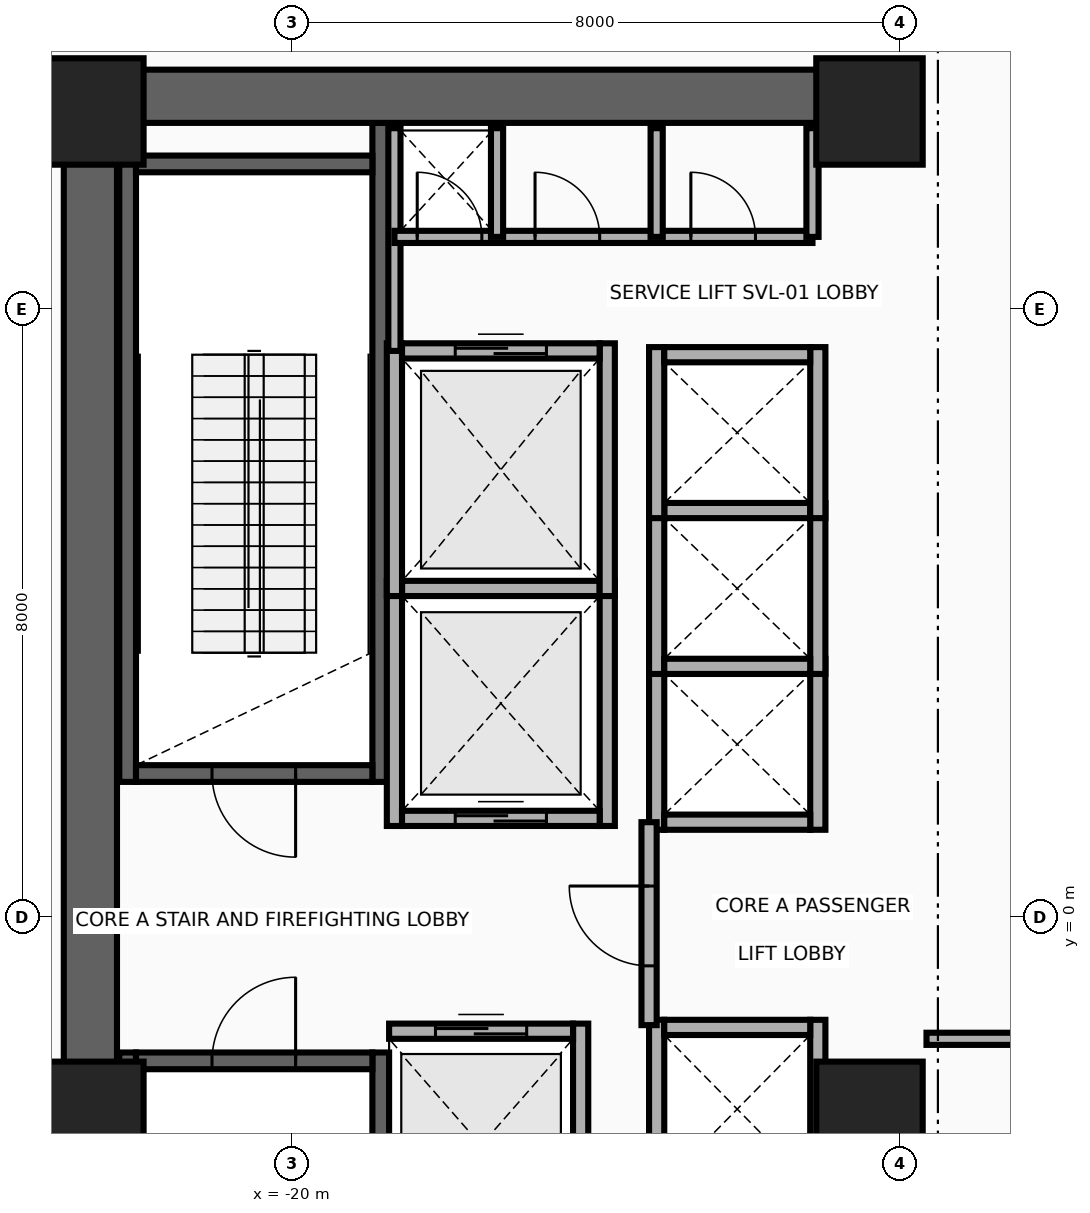
"""IFC4 building model, lengths in metres.
Left out: names, types, materials, properties, quantities, classifications, styles, units other than length and angle.
Written with IfcOpenShell. Run it as: python <this file> out.ifc"""

import sys

from ifc_helpers import new_model, si_unit, direction, frame, frame_2d, origin, origin_2d, place, context, subcontext, project, spatial, rectangle, extrude, source, transform, mapped, element, fill, save


model = new_model("IFC4")
c1 = context("Model", 3, precision=1e-05, world=origin(), true_north=direction((0.0, 1.0)))
c2 = subcontext(c1, "Body", "Model", "MODEL_VIEW")
j1 = project(units=[si_unit("LENGTHUNIT", "METRE"), si_unit("PLANEANGLEUNIT", "RADIAN")], contexts=[c1])
p1 = place(None, origin())
s1 = spatial("IfcSite", under=j1, at=p1, CompositionType="ELEMENT")
p2 = place(p1, origin())
s2 = spatial("IfcBuilding", under=s1, at=p2, CompositionType="ELEMENT")
p3 = place(p2, frame((0.0, 0.0, 5.2)))
s3 = spatial("IfcBuildingStorey", under=s2, at=p3, CompositionType="ELEMENT", Elevation=5.2)
for number, where, z_axis, x_axis in (
    (1, (-22.16, 1.78, 0.0), (0.0, 0.0, 1.0), (0.0, 1.0, 0.0)),
    (2, (-18.83, 1.78, 0.0), (0.0, 0.0, 1.0), (0.0, 1.0, 0.0)),
):
    element("IfcWall", number, at=place(p3, frame(where, z_axis=z_axis, x_axis=x_axis)), inside=s3, PredefinedType="SHEAR", context=c2, shape_type="SweptSolid", body=[
        extrude(rectangle(XDim=8.67, YDim=0.22, at=frame_2d((4.335, 0.0))), origin(), (0.0, 0.0, 1.0), 4.92),
    ])
p4 = place(p3, frame((-22.05, 1.89, 0.0), z_axis=(0.0, 0.0, 1.0), x_axis=(1.0, 0.0, 0.0)))
e3 = element("IfcWall", 3, at=p4, inside=s3, PredefinedType="SHEAR", context=c2, shape_type="SweptSolid", body=[
    extrude(rectangle(XDim=3.11, YDim=0.22, at=frame_2d((1.555, 0.0))), origin(), (0.0, 0.0, 1.0), 4.92),
])
p5 = place(p4, frame((1.0, 0.0, 0.0)))
e4 = element("IfcOpeningElement", 4, at=p5, cuts=e3, PredefinedType="OPENING", context=c2, shape_type="SweptSolid", body=[
    extrude(rectangle(XDim=1.1, YDim=2.15, at=frame_2d((0.55, 1.075))), frame((0.0, 0.125, 0.0), z_axis=(0.0, -1.0, 0.0), x_axis=(1.0, 0.0, 0.0)), (0.0, 0.0, 1.0), 0.25),
])
p6 = place(p3, frame((-22.05, 9.91, 0.0), z_axis=(0.0, 0.0, 1.0), x_axis=(1.0, 0.0, 0.0)))
e5 = element("IfcWall", 5, at=p6, inside=s3, PredefinedType="SHEAR", context=c2, shape_type="SweptSolid", body=[
    extrude(rectangle(XDim=3.11, YDim=0.22, at=frame_2d((1.555, 0.0))), origin(), (0.0, 0.0, 1.0), 4.92),
])
for number, where, z_axis, x_axis in (
    (6, (-22.16, -10.45, 0.0), (0.0, 0.0, 1.0), (0.0, 1.0, 0.0)),
    (7, (-18.83, -10.45, 0.0), (0.0, 0.0, 1.0), (0.0, 1.0, 0.0)),
):
    element("IfcWall", number, at=place(p3, frame(where, z_axis=z_axis, x_axis=x_axis)), inside=s3, PredefinedType="SHEAR", context=c2, shape_type="SweptSolid", body=[
        extrude(rectangle(XDim=8.67, YDim=0.22, at=frame_2d((4.335, 0.0))), origin(), (0.0, 0.0, 1.0), 4.92),
    ])
p7 = place(p3, frame((-22.05, -1.89, 0.0), z_axis=(0.0, 0.0, 1.0), x_axis=(1.0, 0.0, 0.0)))
e8 = element("IfcWall", 8, at=p7, inside=s3, PredefinedType="SHEAR", context=c2, shape_type="SweptSolid", body=[
    extrude(rectangle(XDim=3.11, YDim=0.22, at=frame_2d((1.555, 0.0))), origin(), (0.0, 0.0, 1.0), 4.92),
])
p8 = place(p7, frame((1.0, 0.0, 0.0)))
e9 = element("IfcOpeningElement", 9, at=p8, cuts=e8, PredefinedType="OPENING", context=c2, shape_type="SweptSolid", body=[
    extrude(rectangle(XDim=1.1, YDim=2.15, at=frame_2d((0.55, 1.075))), frame((0.0, 0.125, 0.0), z_axis=(0.0, -1.0, 0.0), x_axis=(1.0, 0.0, 0.0)), (0.0, 0.0, 1.0), 0.25),
])
p9 = place(p3, frame((-22.65, -11.15, 0.0), z_axis=(0.0, 0.0, 1.0), x_axis=(0.0, 1.0, 0.0)))
e10 = element("IfcWall", 10, at=p9, inside=s3, PredefinedType="SHEAR", context=c2, shape_type="SweptSolid", body=[
    extrude(rectangle(XDim=22.3, YDim=0.7, at=frame_2d((11.15, 0.0))), origin(), (0.0, 0.0, 1.0), 4.92),
])
p10 = place(p3, frame((-22.65, 10.8, 0.0), z_axis=(0.0, 0.0, 1.0), x_axis=(1.0, 0.0, 0.0)))
e11 = element("IfcWall", 11, at=p10, inside=s3, PredefinedType="SHEAR", context=c2, shape_type="SweptSolid", body=[
    extrude(rectangle(XDim=10.25, YDim=0.7, at=frame_2d((5.125, 0.0))), origin(), (0.0, 0.0, 1.0), 4.92),
])
m1 = source(origin(), c2, "Body", "SweptSolid", [
    extrude(rectangle(XDim=1.4, YDim=1.4, at=origin_2d()), origin(), (0.0, 0.0, 1.0), 5.2),
])
for number, where, z_axis, x_axis in (
    (12, (-22.65, -2.6, 0.0), (0.0, 0.0, 1.0), (1.0, 0.0, 0.0)),
    (13, (-12.4, -2.6, 0.0), (0.0, 0.0, 1.0), (1.0, 0.0, 0.0)),
    (14, (-22.65, 10.6, 0.0), (0.0, 0.0, 1.0), (1.0, 0.0, 0.0)),
    (15, (-12.4, 10.6, 0.0), (0.0, 0.0, 1.0), (1.0, 0.0, 0.0)),
):
    element("IfcColumn", number, at=place(p3, frame(where, z_axis=z_axis, x_axis=x_axis)), inside=s3, PredefinedType="COLUMN", context=c2, shape_type="MappedRepresentation", body=[
        mapped(m1, transform((0.0, 0.0, 0.0), x_axis=(1.0, 0.0, 0.0), y_axis=(0.0, 1.0, 0.0), z_axis=(0.0, 0.0, 1.0), scale=1.0)),
    ])
for number, where, z_axis, x_axis in (
    (16, (-18.65, 1.2, 0.0), (0.0, 0.0, 1.0), (0.0, 1.0, 0.0)),
    (17, (-15.85, 1.2, 0.0), (0.0, 0.0, 1.0), (0.0, 1.0, 0.0)),
):
    element("IfcWall", number, at=place(p3, frame(where, z_axis=z_axis, x_axis=x_axis)), inside=s3, PredefinedType="MOVABLE", context=c2, shape_type="SweptSolid", body=[
        extrude(rectangle(XDim=3.225, YDim=0.2, at=frame_2d((1.613, 0.0))), origin(), (0.0, 0.0, 1.0), 4.92),
    ])
p11 = place(p3, frame((-18.55, 1.3, 0.0), z_axis=(0.0, 0.0, 1.0), x_axis=(1.0, 0.0, 0.0)))
e18 = element("IfcWall", 18, at=p11, inside=s3, PredefinedType="MOVABLE", context=c2, shape_type="SweptSolid", body=[
    extrude(rectangle(XDim=2.6, YDim=0.2, at=frame_2d((1.3, 0.0))), origin(), (0.0, 0.0, 1.0), 4.92),
])
p12 = place(p11, frame((0.7, 0.0, 0.0)))
e19 = element("IfcOpeningElement", 19, at=p12, cuts=e18, PredefinedType="OPENING", context=c2, shape_type="SweptSolid", body=[
    extrude(rectangle(XDim=1.2, YDim=2.1, at=frame_2d((0.6, 1.05))), frame((0.0, 0.115, 0.0), z_axis=(0.0, -1.0, 0.0), x_axis=(1.0, 0.0, 0.0)), (0.0, 0.0, 1.0), 0.23),
])
p13 = place(p3, frame((-18.55, 4.325, 0.0), z_axis=(0.0, 0.0, 1.0), x_axis=(1.0, 0.0, 0.0)))
e20 = element("IfcWall", 20, at=p13, inside=s3, PredefinedType="MOVABLE", context=c2, shape_type="SweptSolid", body=[
    extrude(rectangle(XDim=2.6, YDim=0.2, at=frame_2d((1.3, 0.0))), origin(), (0.0, 0.0, 1.0), 4.92),
])
p14 = place(p3, frame((-16.2, -4.6, 0.0), z_axis=(0.0, 0.0, 1.0), x_axis=(0.0, 1.0, 0.0)))
e21 = element("IfcWall", 21, at=p14, inside=s3, PredefinedType="MOVABLE", context=c2, shape_type="SweptSolid", body=[
    extrude(rectangle(XDim=3.2, YDim=0.2, at=frame_2d((1.6, 0.0))), origin(), (0.0, 0.0, 1.0), 4.92),
])
p15 = place(p3, frame((-18.72, -1.5, 0.0), z_axis=(0.0, 0.0, 1.0), x_axis=(1.0, 0.0, 0.0)))
e22 = element("IfcWall", 22, at=p15, inside=s3, PredefinedType="MOVABLE", context=c2, shape_type="SweptSolid", body=[
    extrude(rectangle(XDim=2.42, YDim=0.2, at=frame_2d((1.21, 0.0))), origin(), (0.0, 0.0, 1.0), 4.92),
])
p16 = place(p15, frame((0.61, 0.0, 0.0)))
e23 = element("IfcOpeningElement", 23, at=p16, cuts=e22, PredefinedType="OPENING", context=c2, shape_type="SweptSolid", body=[
    extrude(rectangle(XDim=1.2, YDim=2.1, at=frame_2d((0.6, 1.05))), frame((0.0, 0.115, 0.0), z_axis=(0.0, -1.0, 0.0), x_axis=(1.0, 0.0, 0.0)), (0.0, 0.0, 1.0), 0.23),
])
for number, where, z_axis, x_axis in (
    (24, (-18.65, 4.225, 0.0), (0.0, 0.0, 1.0), (0.0, 1.0, 0.0)),
    (25, (-15.85, 4.225, 0.0), (0.0, 0.0, 1.0), (0.0, 1.0, 0.0)),
):
    element("IfcWall", number, at=place(p3, frame(where, z_axis=z_axis, x_axis=x_axis)), inside=s3, PredefinedType="MOVABLE", context=c2, shape_type="SweptSolid", body=[
        extrude(rectangle(XDim=3.325, YDim=0.2, at=frame_2d((1.663, 0.0))), origin(), (0.0, 0.0, 1.0), 4.92),
    ])
p17 = place(p3, frame((-18.55, 7.45, 0.0), z_axis=(0.0, 0.0, 1.0), x_axis=(1.0, 0.0, 0.0)))
e26 = element("IfcWall", 26, at=p17, inside=s3, PredefinedType="MOVABLE", context=c2, shape_type="SweptSolid", body=[
    extrude(rectangle(XDim=2.6, YDim=0.2, at=frame_2d((1.3, 0.0))), origin(), (0.0, 0.0, 1.0), 4.92),
])
p18 = place(p17, frame((0.7, 0.0, 0.0)))
e27 = element("IfcOpeningElement", 27, at=p18, cuts=e26, PredefinedType="OPENING", context=c2, shape_type="SweptSolid", body=[
    extrude(rectangle(XDim=1.2, YDim=2.1, at=frame_2d((0.6, 1.05))), frame((0.0, 0.115, 0.0), z_axis=(0.0, -1.0, 0.0), x_axis=(1.0, 0.0, 0.0)), (0.0, 0.0, 1.0), 0.23),
])
for number, where, z_axis, x_axis in (
    (28, (-15.2, 1.15, 0.0), (0.0, 0.0, 1.0), (0.0, 1.0, 0.0)),
    (29, (-13.08, 1.15, 0.0), (0.0, 0.0, 1.0), (0.0, 1.0, 0.0)),
):
    element("IfcWall", number, at=place(p3, frame(where, z_axis=z_axis, x_axis=x_axis)), inside=s3, PredefinedType="MOVABLE", context=c2, shape_type="SweptSolid", body=[
        extrude(rectangle(XDim=2.25, YDim=0.2, at=frame_2d((1.125, 0.0))), origin(), (0.0, 0.0, 1.0), 4.92),
    ])
p19 = place(p3, frame((-15.1, 1.25, 0.0), z_axis=(0.0, 0.0, 1.0), x_axis=(1.0, 0.0, 0.0)))
e30 = element("IfcWall", 30, at=p19, inside=s3, PredefinedType="MOVABLE", context=c2, shape_type="SweptSolid", body=[
    extrude(rectangle(XDim=1.92, YDim=0.2, at=frame_2d((0.96, 0.0))), origin(), (0.0, 0.0, 1.0), 4.92),
])
for number, where, z_axis, x_axis in (
    (31, (-15.2, 3.2, 0.0), (0.0, 0.0, 1.0), (0.0, 1.0, 0.0)),
    (32, (-13.08, 3.2, 0.0), (0.0, 0.0, 1.0), (0.0, 1.0, 0.0)),
):
    element("IfcWall", number, at=place(p3, frame(where, z_axis=z_axis, x_axis=x_axis)), inside=s3, PredefinedType="MOVABLE", context=c2, shape_type="SweptSolid", body=[
        extrude(rectangle(XDim=2.25, YDim=0.2, at=frame_2d((1.125, 0.0))), origin(), (0.0, 0.0, 1.0), 4.92),
    ])
for number, where, z_axis, x_axis in (
    (33, (-15.1, 3.3, 0.0), (0.0, 0.0, 1.0), (1.0, 0.0, 0.0)),
    (34, (-15.1, 5.35, 0.0), (0.0, 0.0, 1.0), (1.0, 0.0, 0.0)),
):
    element("IfcWall", number, at=place(p3, frame(where, z_axis=z_axis, x_axis=x_axis)), inside=s3, PredefinedType="MOVABLE", context=c2, shape_type="SweptSolid", body=[
        extrude(rectangle(XDim=1.92, YDim=0.2, at=frame_2d((0.96, 0.0))), origin(), (0.0, 0.0, 1.0), 4.92),
    ])
for number, where, z_axis, x_axis in (
    (35, (-15.2, 5.25, 0.0), (0.0, 0.0, 1.0), (0.0, 1.0, 0.0)),
    (36, (-13.08, 5.25, 0.0), (0.0, 0.0, 1.0), (0.0, 1.0, 0.0)),
):
    element("IfcWall", number, at=place(p3, frame(where, z_axis=z_axis, x_axis=x_axis)), inside=s3, PredefinedType="MOVABLE", context=c2, shape_type="SweptSolid", body=[
        extrude(rectangle(XDim=2.25, YDim=0.2, at=frame_2d((1.125, 0.0))), origin(), (0.0, 0.0, 1.0), 4.92),
    ])
p20 = place(p3, frame((-15.1, 7.4, 0.0), z_axis=(0.0, 0.0, 1.0), x_axis=(1.0, 0.0, 0.0)))
e37 = element("IfcWall", 37, at=p20, inside=s3, PredefinedType="MOVABLE", context=c2, shape_type="SweptSolid", body=[
    extrude(rectangle(XDim=1.92, YDim=0.2, at=frame_2d((0.96, 0.0))), origin(), (0.0, 0.0, 1.0), 4.92),
])
for number, where, z_axis, x_axis in (
    (38, (-15.2, -3.7, 0.0), (0.0, 0.0, 1.0), (0.0, 1.0, 0.0)),
    (39, (-13.08, -3.7, 0.0), (0.0, 0.0, 1.0), (0.0, 1.0, 0.0)),
):
    element("IfcWall", number, at=place(p3, frame(where, z_axis=z_axis, x_axis=x_axis)), inside=s3, PredefinedType="MOVABLE", context=c2, shape_type="SweptSolid", body=[
        extrude(rectangle(XDim=2.35, YDim=0.2, at=frame_2d((1.175, 0.0))), origin(), (0.0, 0.0, 1.0), 4.92),
    ])
p21 = place(p3, frame((-15.1, -1.45, 0.0), z_axis=(0.0, 0.0, 1.0), x_axis=(1.0, 0.0, 0.0)))
e40 = element("IfcWall", 40, at=p21, inside=s3, PredefinedType="MOVABLE", context=c2, shape_type="SweptSolid", body=[
    extrude(rectangle(XDim=1.92, YDim=0.2, at=frame_2d((0.96, 0.0))), origin(), (0.0, 0.0, 1.0), 4.92),
])
p22 = place(p3, frame((-15.3, -1.42, 0.0), z_axis=(0.0, 0.0, 1.0), x_axis=(0.0, 1.0, 0.0)))
e41 = element("IfcWall", 41, at=p22, inside=s3, PredefinedType="PARTITIONING", context=c2, shape_type="SweptSolid", body=[
    extrude(rectangle(XDim=2.67, YDim=0.2, at=frame_2d((1.335, 0.0))), origin(), (0.0, 0.0, 1.0), 4.92),
])
p23 = place(p22, frame((0.78, 0.0, 0.0)))
e42 = element("IfcOpeningElement", 42, at=p23, cuts=e41, PredefinedType="OPENING", context=c2, shape_type="SweptSolid", body=[
    extrude(rectangle(XDim=1.05, YDim=2.15, at=frame_2d((0.525, 1.075))), frame((0.0, 0.115, 0.0), z_axis=(0.0, -1.0, 0.0), x_axis=(1.0, 0.0, 0.0)), (0.0, 0.0, 1.0), 0.23),
])
p24 = place(p3, frame((-18.65, 7.45, 0.0), z_axis=(0.0, 0.0, 1.0), x_axis=(0.0, 1.0, 0.0)))
e43 = element("IfcWall", 43, at=p24, inside=s3, PredefinedType="PARTITIONING", context=c2, shape_type="SweptSolid", body=[
    extrude(rectangle(XDim=2.93, YDim=0.16, at=frame_2d((1.465, 0.0))), origin(), (0.0, 0.0, 1.0), 3.957),
])
p25 = place(p3, frame((-18.65, 8.95, 0.0), z_axis=(0.0, 0.0, 1.0), x_axis=(1.0, 0.0, 0.0)))
e44 = element("IfcWall", 44, at=p25, inside=s3, PredefinedType="PARTITIONING", context=c2, shape_type="SweptSolid", body=[
    extrude(rectangle(XDim=5.5, YDim=0.16, at=frame_2d((2.75, 0.0))), origin(), (0.0, 0.0, 1.0), 4.92),
])
p26 = place(p25, frame((0.3, 0.0, 0.0)))
e45 = element("IfcOpeningElement", 45, at=p26, cuts=e44, PredefinedType="OPENING", context=c2, shape_type="SweptSolid", body=[
    extrude(rectangle(XDim=0.85, YDim=2.05, at=frame_2d((0.425, 1.025))), frame((0.0, 0.095, 0.0), z_axis=(0.0, -1.0, 0.0), x_axis=(1.0, 0.0, 0.0)), (0.0, 0.0, 1.0), 0.19),
])
p27 = place(p25, frame((1.85, 0.0, 0.0)))
e46 = element("IfcOpeningElement", 46, at=p27, cuts=e44, PredefinedType="OPENING", context=c2, shape_type="SweptSolid", body=[
    extrude(rectangle(XDim=0.85, YDim=2.05, at=frame_2d((0.425, 1.025))), frame((0.0, 0.095, 0.0), z_axis=(0.0, -1.0, 0.0), x_axis=(1.0, 0.0, 0.0)), (0.0, 0.0, 1.0), 0.19),
])
p28 = place(p25, frame((3.9, 0.0, 0.0)))
e47 = element("IfcOpeningElement", 47, at=p28, cuts=e44, PredefinedType="OPENING", context=c2, shape_type="SweptSolid", body=[
    extrude(rectangle(XDim=0.85, YDim=2.05, at=frame_2d((0.425, 1.025))), frame((0.0, 0.095, 0.0), z_axis=(0.0, -1.0, 0.0), x_axis=(1.0, 0.0, 0.0)), (0.0, 0.0, 1.0), 0.19),
])
for number, where, z_axis, x_axis in (
    (48, (-13.15, 8.95, 0.0), (0.0, 0.0, 1.0), (0.0, 1.0, 0.0)),
    (49, (-17.3, 8.95, 0.0), (0.0, 0.0, 1.0), (0.0, 1.0, 0.0)),
    (50, (-15.2, 8.95, 0.0), (0.0, 0.0, 1.0), (0.0, 1.0, 0.0)),
):
    element("IfcWall", number, at=place(p3, frame(where, z_axis=z_axis, x_axis=x_axis)), inside=s3, PredefinedType="PARTITIONING", context=c2, shape_type="SweptSolid", body=[
        extrude(rectangle(XDim=1.43, YDim=0.16, at=frame_2d((0.715, 0.0))), origin(), (0.0, 0.0, 1.0), 3.957),
    ])
p29 = place(p3, frame((-11.65, -1.6, 0.0), z_axis=(0.0, 0.0, 1.0), x_axis=(1.0, 0.0, 0.0)))
e51 = element("IfcWall", 51, at=p29, inside=s3, PredefinedType="PARTITIONING", context=c2, shape_type="SweptSolid", body=[
    extrude(rectangle(XDim=1.85, YDim=0.16, at=frame_2d((0.925, 0.0))), origin(), (0.0, 0.0, 1.0), 4.92),
])
p30 = place(p12, origin())
e52 = element("IfcDoor", 52, at=p30, inside=s3, OperationType="DOUBLE_DOOR_SLIDING", PredefinedType="DOOR", context=c2, shape_type="SweptSolid", body=[
    extrude(rectangle(XDim=1.2, YDim=2.1, at=frame_2d((0.6, 1.05))), frame((0.0, 0.025, 0.0), z_axis=(0.0, -1.0, 0.0), x_axis=(1.0, 0.0, 0.0)), (0.0, 0.0, 1.0), 0.05),
])
fill(e19, e52)
p31 = place(p16, origin())
e53 = element("IfcDoor", 53, at=p31, inside=s3, OperationType="DOUBLE_DOOR_SLIDING", PredefinedType="DOOR", context=c2, shape_type="SweptSolid", body=[
    extrude(rectangle(XDim=1.2, YDim=2.1, at=frame_2d((0.6, 1.05))), frame((0.0, 0.025, 0.0), z_axis=(0.0, -1.0, 0.0), x_axis=(1.0, 0.0, 0.0)), (0.0, 0.0, 1.0), 0.05),
])
fill(e23, e53)
p32 = place(p18, origin())
e54 = element("IfcDoor", 54, at=p32, inside=s3, OperationType="DOUBLE_DOOR_SLIDING", PredefinedType="DOOR", context=c2, shape_type="SweptSolid", body=[
    extrude(rectangle(XDim=1.2, YDim=2.1, at=frame_2d((0.6, 1.05))), frame((0.0, 0.025, 0.0), z_axis=(0.0, -1.0, 0.0), x_axis=(1.0, 0.0, 0.0)), (0.0, 0.0, 1.0), 0.05),
])
fill(e27, e54)
p33 = place(p23, origin())
e55 = element("IfcDoor", 55, at=p33, inside=s3, OperationType="SINGLE_SWING_RIGHT", PredefinedType="DOOR", context=c2, shape_type="SweptSolid", body=[
    extrude(rectangle(XDim=1.05, YDim=2.15, at=frame_2d((0.525, 1.075))), frame((0.0, 0.025, 0.0), z_axis=(0.0, -1.0, 0.0), x_axis=(1.0, 0.0, 0.0)), (0.0, 0.0, 1.0), 0.05),
])
fill(e42, e55)
p34 = place(p5, frame((1.1, 0.0, 0.0), z_axis=(0.0, 0.0, 1.0), x_axis=(-1.0, 0.0, 0.0)))
e56 = element("IfcDoor", 56, at=p34, inside=s3, OperationType="SINGLE_SWING_LEFT", PredefinedType="DOOR", context=c2, shape_type="SweptSolid", body=[
    extrude(rectangle(XDim=1.1, YDim=2.15, at=frame_2d((0.55, 1.075))), frame((0.0, 0.025, 0.0), z_axis=(0.0, -1.0, 0.0), x_axis=(1.0, 0.0, 0.0)), (0.0, 0.0, 1.0), 0.05),
])
fill(e4, e56)
p35 = place(p8, origin())
e57 = element("IfcDoor", 57, at=p35, inside=s3, OperationType="SINGLE_SWING_RIGHT", PredefinedType="DOOR", context=c2, shape_type="SweptSolid", body=[
    extrude(rectangle(XDim=1.1, YDim=2.15, at=frame_2d((0.55, 1.075))), frame((0.0, 0.025, 0.0), z_axis=(0.0, -1.0, 0.0), x_axis=(1.0, 0.0, 0.0)), (0.0, 0.0, 1.0), 0.05),
])
fill(e9, e57)
p36 = place(p26, origin())
e58 = element("IfcDoor", 58, at=p36, inside=s3, OperationType="SINGLE_SWING_LEFT", PredefinedType="DOOR", context=c2, shape_type="SweptSolid", body=[
    extrude(rectangle(XDim=0.85, YDim=2.05, at=frame_2d((0.425, 1.025))), frame((0.0, 0.025, 0.0), z_axis=(0.0, -1.0, 0.0), x_axis=(1.0, 0.0, 0.0)), (0.0, 0.0, 1.0), 0.05),
])
fill(e45, e58)
p37 = place(p27, origin())
e59 = element("IfcDoor", 59, at=p37, inside=s3, OperationType="SINGLE_SWING_RIGHT", PredefinedType="DOOR", context=c2, shape_type="SweptSolid", body=[
    extrude(rectangle(XDim=0.85, YDim=2.05, at=frame_2d((0.425, 1.025))), frame((0.0, 0.025, 0.0), z_axis=(0.0, -1.0, 0.0), x_axis=(1.0, 0.0, 0.0)), (0.0, 0.0, 1.0), 0.05),
])
fill(e46, e59)
p38 = place(p28, origin())
e60 = element("IfcDoor", 60, at=p38, inside=s3, OperationType="SINGLE_SWING_LEFT", PredefinedType="DOOR", context=c2, shape_type="SweptSolid", body=[
    extrude(rectangle(XDim=0.85, YDim=2.05, at=frame_2d((0.425, 1.025))), frame((0.0, 0.025, 0.0), z_axis=(0.0, -1.0, 0.0), x_axis=(1.0, 0.0, 0.0)), (0.0, 0.0, 1.0), 0.05),
])
fill(e47, e60)
save(model, sys.argv[1])
